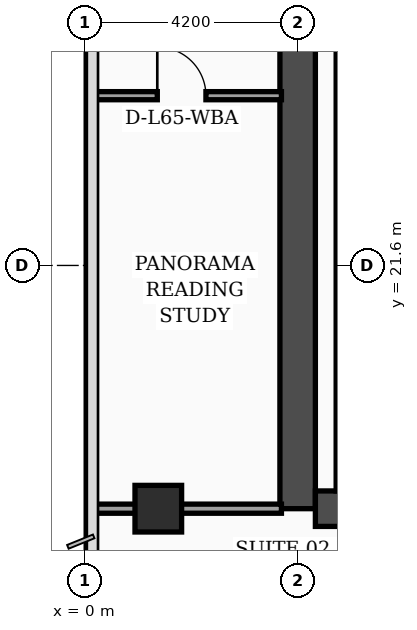
"""IFC4 building model, lengths in metres.
Left out: names, types, materials, properties, quantities, classifications, styles, units other than length and angle.
Written with IfcOpenShell. Run it as: python <this file> out.ifc"""

import sys

from ifc_helpers import new_model, si_unit, direction, frame, frame_2d, origin, origin_2d, place, context, subcontext, project, spatial, rectangle, extrude, element, fill, save


model = new_model("IFC4")
c1 = context("Model", 3, precision=1e-05, world=origin(), true_north=direction((0.0, 1.0)))
c2 = subcontext(c1, "Body", "Model", "MODEL_VIEW")
j1 = project(units=[si_unit("LENGTHUNIT", "METRE"), si_unit("PLANEANGLEUNIT", "RADIAN")], contexts=[c1])
p1 = place(None, origin())
s1 = spatial("IfcSite", under=j1, at=p1, CompositionType="ELEMENT")
p2 = place(p1, origin())
s2 = spatial("IfcBuilding", under=s1, at=p2, CompositionType="ELEMENT")
p3 = place(p2, frame((0.0, 0.0, 263.5)))
s3 = spatial("IfcBuildingStorey", under=s2, at=p3, CompositionType="ELEMENT", Elevation=263.5)
p4 = place(p3, frame((4.2, 16.8, 0.0), z_axis=(0.0, 0.0, 1.0), x_axis=(0.0, 1.0, 0.0)))
e1 = element("IfcWall", 1, at=p4, inside=s3, PredefinedType="SHEAR", context=c2, shape_type="SweptSolid", body=[
    extrude(rectangle(XDim=21.6, YDim=0.7, at=frame_2d((10.8, 0.0))), origin(), (0.0, 0.0, 1.0), 3.56),
])
p5 = place(p3, frame((4.55, 16.8, 0.0), z_axis=(0.0, 0.0, 1.0), x_axis=(1.0, 0.0, 0.0)))
e2 = element("IfcWall", 2, at=p5, inside=s3, PredefinedType="SHEAR", context=c2, shape_type="SweptSolid", body=[
    extrude(rectangle(XDim=10.1, YDim=0.7, at=frame_2d((5.05, 0.0))), origin(), (0.0, 0.0, 1.0), 3.56),
])
p6 = place(p3, frame((5.08, 17.15, 0.0), z_axis=(0.0, 0.0, 1.0), x_axis=(0.0, 1.0, 0.0)))
e3 = element("IfcWall", 3, at=p6, inside=s3, PredefinedType="SOLIDWALL", context=c2, shape_type="SweptSolid", body=[
    extrude(rectangle(XDim=9.64, YDim=0.24, at=frame_2d((4.82, 0.0))), origin(), (0.0, 0.0, 1.0), 3.56),
])
p7 = place(p3, frame((1.45, 16.8, 0.0), z_axis=(0.0, 0.0, 1.0), x_axis=(1.0, 0.0, 0.0)))
e4 = element("IfcColumn", 4, at=p7, inside=s3, PredefinedType="COLUMN", context=c2, shape_type="SweptSolid", body=[
    extrude(rectangle(XDim=0.92, YDim=0.92, at=origin_2d()), origin(), (0.0, 0.0, 1.0), 3.56),
])
p8 = place(p3, frame((0.08, 24.95, 0.0), z_axis=(0.0, 0.0, 1.0), x_axis=(1.0, 0.0, 0.0)))
e5 = element("IfcWall", 5, at=p8, inside=s3, PredefinedType="PARTITIONING", context=c2, shape_type="SweptSolid", body=[
    extrude(rectangle(XDim=3.8, YDim=0.16, at=frame_2d((1.9, 0.0))), origin(), (0.0, 0.0, 1.0), 3.09),
])
p9 = place(p8, frame((1.35, 0.0, 0.0)))
e6 = element("IfcOpeningElement", 6, at=p9, cuts=e5, PredefinedType="OPENING", context=c2, shape_type="SweptSolid", body=[
    extrude(rectangle(XDim=0.96, YDim=2.2, at=frame_2d((0.48, 1.1))), frame((0.0, 0.09, 0.0), z_axis=(0.0, -1.0, 0.0), x_axis=(1.0, 0.0, 0.0)), (0.0, 0.0, 1.0), 0.18),
])
p10 = place(p3, frame((0.08, 16.8, 0.0), z_axis=(0.0, 0.0, 1.0), x_axis=(1.0, 0.0, 0.0)))
e7 = element("IfcWall", 7, at=p10, inside=s3, PredefinedType="PARTITIONING", context=c2, shape_type="SweptSolid", body=[
    extrude(rectangle(XDim=3.8, YDim=0.18, at=frame_2d((1.9, 0.0))), origin(), (0.0, 0.0, 1.0), 2.99),
])
p11 = place(p9, origin())
e8 = element("IfcDoor", 8, at=p11, inside=s3, OperationType="SINGLE_SWING_LEFT", PredefinedType="DOOR", context=c2, shape_type="SweptSolid", body=[
    extrude(rectangle(XDim=0.96, YDim=2.2, at=frame_2d((0.48, 1.1))), frame((0.0, 0.025, 0.0), z_axis=(0.0, -1.0, 0.0), x_axis=(1.0, 0.0, 0.0)), (0.0, 0.0, 1.0), 0.05),
])
fill(e6, e8)
save(model, sys.argv[1])
